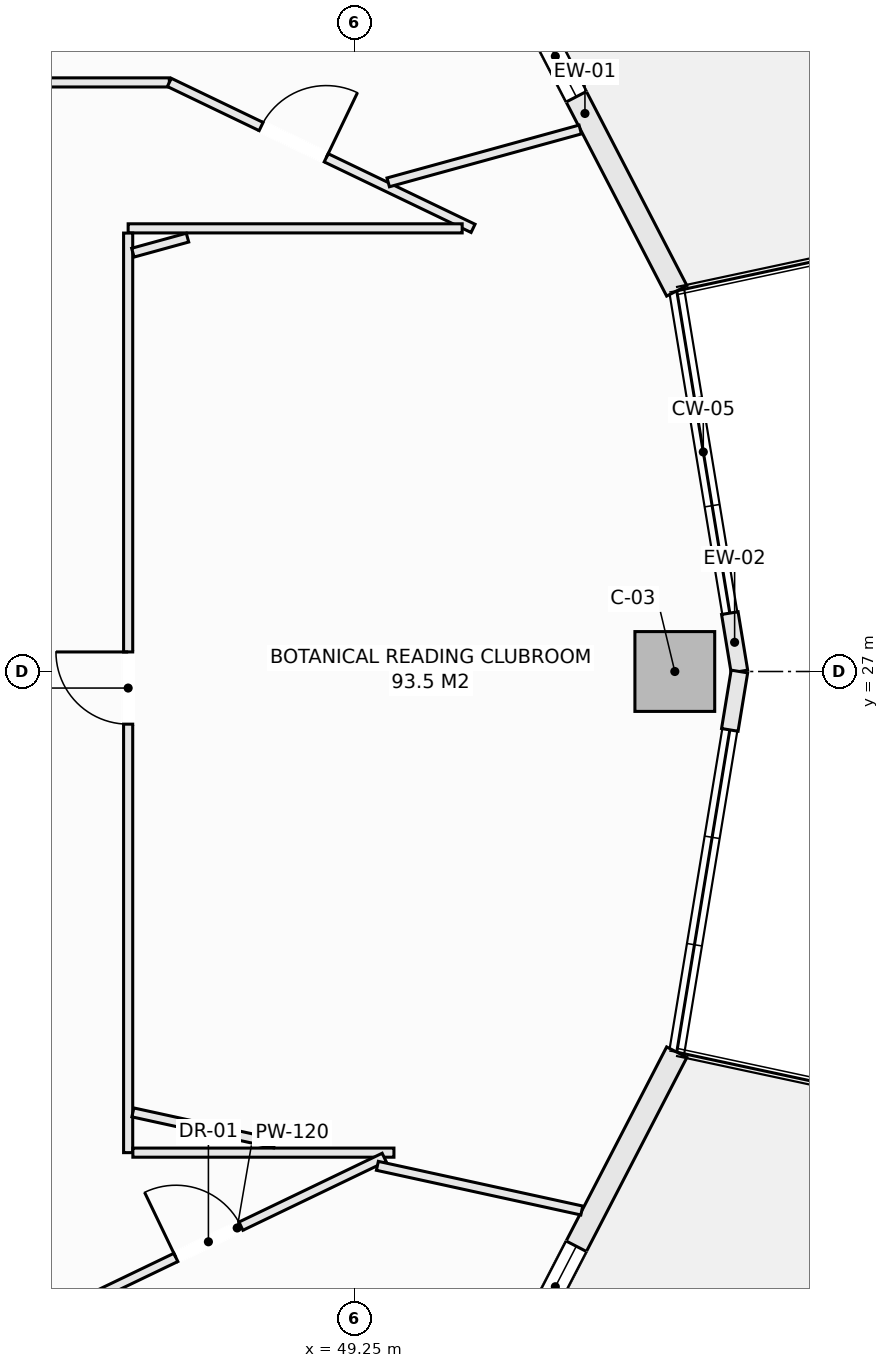
"""IFC4 building model, lengths in metres.
Left out: names, types, materials, properties, quantities, classifications, styles, units other than length and angle.
Written with IfcOpenShell. Run it as: python <this file> out.ifc"""

import sys

from ifc_helpers import new_model, si_unit, direction, frame, frame_2d, origin, origin_2d, place, context, subcontext, project, spatial, rectangle, extrude, element, fill, save


model = new_model("IFC4")
c1 = context("Model", 3, precision=1e-05, world=origin(), true_north=direction((0.0, 1.0)))
c2 = subcontext(c1, "Body", "Model", "MODEL_VIEW")
j1 = project(units=[si_unit("LENGTHUNIT", "METRE"), si_unit("PLANEANGLEUNIT", "RADIAN")], contexts=[c1])
p1 = place(None, origin())
s1 = spatial("IfcSite", under=j1, at=p1, CompositionType="ELEMENT")
p2 = place(p1, origin())
s2 = spatial("IfcBuilding", under=s1, at=p2, CompositionType="ELEMENT")
p3 = place(p2, frame((0.0, 0.0, 100.8)))
s3 = spatial("IfcBuildingStorey", under=s2, at=p3, CompositionType="ELEMENT", Elevation=100.8)
p4 = place(p3, frame((53.462, 27.0, -0.28), z_axis=(0.0, 0.0, 1.0), x_axis=(1.0, 0.0, 0.0)))
e1 = element("IfcColumn", 1, at=p4, inside=s3, PredefinedType="COLUMN", context=c2, shape_type="SweptSolid", body=[
    extrude(rectangle(XDim=1.05, YDim=1.05, at=origin_2d()), origin(), (0.0, 0.0, 1.0), 4.51),
])
p5 = place(p3, frame((54.186, 27.768, 0.0), z_axis=(0.0, 0.0, 1.0), x_axis=(0.162465965887, -0.986714148033, 0.0)))
e2 = element("IfcWall", 2, at=p5, inside=s3, PredefinedType="SOLIDWALL", context=c2, shape_type="SweptSolid", body=[
    extrude(rectangle(XDim=0.778, YDim=0.22, at=frame_2d((0.389, 0.0))), origin(), (0.0, 0.0, 1.0), 3.753),
])
p6 = place(p3, frame((51.072, 36.675, 0.0), z_axis=(0.0, 0.0, 1.0), x_axis=(0.459767899643, -0.888039119892, 0.0)))
e3 = element("IfcWall", 3, at=p6, inside=s3, PredefinedType="SOLIDWALL", context=c2, shape_type="SweptSolid", body=[
    extrude(rectangle(XDim=5.255, YDim=0.3, at=frame_2d((2.628, 0.0))), origin(), (0.0, 0.0, 1.0), 3.753),
])
p7 = place(p6, frame((1.18, 0.0, 0.72)))
e4 = element("IfcOpeningElement", 4, at=p7, cuts=e3, PredefinedType="OPENING", context=c2, shape_type="SweptSolid", body=[
    extrude(rectangle(XDim=1.2, YDim=1.65, at=frame_2d((0.6, 0.825))), frame((0.0, 0.16, 0.0), z_axis=(0.0, -1.0, 0.0), x_axis=(1.0, 0.0, 0.0)), (0.0, 0.0, 1.0), 0.32),
])
p8 = place(p3, frame((51.072, 17.325, 0.0), z_axis=(0.0, 0.0, 1.0), x_axis=(0.459767899643, 0.888039119892, 0.0)))
e5 = element("IfcWall", 5, at=p8, inside=s3, PredefinedType="SOLIDWALL", context=c2, shape_type="SweptSolid", body=[
    extrude(rectangle(XDim=5.255, YDim=0.3, at=frame_2d((2.628, 0.0))), origin(), (0.0, 0.0, 1.0), 3.753),
])
p9 = place(p8, frame((1.18, 0.0, 0.72)))
e6 = element("IfcOpeningElement", 6, at=p9, cuts=e5, PredefinedType="OPENING", context=c2, shape_type="SweptSolid", body=[
    extrude(rectangle(XDim=1.2, YDim=1.65, at=frame_2d((0.6, 0.825))), frame((0.0, 0.16, 0.0), z_axis=(0.0, -1.0, 0.0), x_axis=(1.0, 0.0, 0.0)), (0.0, 0.0, 1.0), 0.32),
])
p10 = place(p3, frame((54.186, 26.232, 0.0), z_axis=(0.0, 0.0, 1.0), x_axis=(0.162465965887, 0.986714148033, 0.0)))
e7 = element("IfcWall", 7, at=p10, inside=s3, PredefinedType="SOLIDWALL", context=c2, shape_type="SweptSolid", body=[
    extrude(rectangle(XDim=0.778, YDim=0.22, at=frame_2d((0.389, 0.0))), origin(), (0.0, 0.0, 1.0), 3.753),
])
for number, where, z_axis, x_axis in (
    (8, (54.129, 38.122, 0.0), (0.0, 0.0, 1.0), (0.441, -0.897, 0.0)),
    (9, (54.129, 15.878, 0.0), (0.0, 0.0, 1.0), (0.441, 0.897, 0.0)),
):
    element("IfcWall", number, at=place(p3, frame(where, z_axis=z_axis, x_axis=x_axis)), inside=s3, PredefinedType="PARAPET", context=c2, shape_type="SweptSolid", body=[
        extrude(rectangle(XDim=6.056, YDim=0.22, at=frame_2d((3.028, 0.0))), origin(), (0.0, 0.0, 1.0), 0.52),
    ])
p11 = place(p3, frame((44.412, 34.75, 0.0), z_axis=(0.0, 0.0, 1.0), x_axis=(1.0, 0.0, 0.0)))
e10 = element("IfcWall", 10, at=p11, inside=s3, PredefinedType="PARTITIONING", context=c2, shape_type="SweptSolid", body=[
    extrude(rectangle(XDim=2.4, YDim=0.12, at=frame_2d((1.2, 0.0))), origin(), (0.0, 0.0, 1.0), 3.912),
])
p12 = place(p3, frame((46.812, 34.75, 0.0), z_axis=(0.0, 0.0, 1.0), x_axis=(0.901364880585, -0.433060448492, 0.0)))
e11 = element("IfcWall", 11, at=p12, inside=s3, PredefinedType="PARTITIONING", context=c2, shape_type="SweptSolid", body=[
    extrude(rectangle(XDim=4.433, YDim=0.12, at=frame_2d((2.217, 0.0))), origin(), (0.0, 0.0, 1.0), 4.23),
])
p13 = place(p12, frame((1.34, 0.0, 0.0)))
e12 = element("IfcOpeningElement", 12, at=p13, cuts=e11, PredefinedType="OPENING", context=c2, shape_type="SweptSolid", body=[
    extrude(rectangle(XDim=0.95, YDim=2.1, at=frame_2d((0.475, 1.05))), frame((0.0, 0.07, 0.0), z_axis=(0.0, -1.0, 0.0), x_axis=(1.0, 0.0, 0.0)), (0.0, 0.0, 1.0), 0.14),
])
p14 = place(p3, frame((46.27, 32.83, 0.0), z_axis=(0.0, 0.0, 1.0), x_axis=(1.0, 0.0, 0.0)))
e13 = element("IfcWall", 13, at=p14, inside=s3, PredefinedType="PARTITIONING", context=c2, shape_type="SweptSolid", body=[
    extrude(rectangle(XDim=4.395, YDim=0.12, at=frame_2d((2.197, 0.0))), origin(), (0.0, 0.0, 1.0), 4.23),
])
p15 = place(p3, frame((46.27, 20.67, 0.0), z_axis=(0.0, 0.0, 1.0), x_axis=(0.0, 1.0, 0.0)))
e14 = element("IfcWall", 14, at=p15, inside=s3, PredefinedType="PARTITIONING", context=c2, shape_type="SweptSolid", body=[
    extrude(rectangle(XDim=12.098, YDim=0.12, at=frame_2d((6.049, 0.0))), origin(), (0.0, 0.0, 1.0), 4.23),
])
p16 = place(p15, frame((5.637, 0.0, 0.0)))
e15 = element("IfcOpeningElement", 15, at=p16, cuts=e14, PredefinedType="OPENING", context=c2, shape_type="SweptSolid", body=[
    extrude(rectangle(XDim=0.95, YDim=2.1, at=frame_2d((0.475, 1.05))), frame((0.0, 0.07, 0.0), z_axis=(0.0, -1.0, 0.0), x_axis=(1.0, 0.0, 0.0)), (0.0, 0.0, 1.0), 0.14),
])
p17 = place(p3, frame((46.332, 20.67, 0.0), z_axis=(0.0, 0.0, 1.0), x_axis=(1.0, 0.0, 0.0)))
e16 = element("IfcWall", 16, at=p17, inside=s3, PredefinedType="PARTITIONING", context=c2, shape_type="SweptSolid", body=[
    extrude(rectangle(XDim=3.435, YDim=0.12, at=frame_2d((1.718, 0.0))), origin(), (0.0, 0.0, 1.0), 4.23),
])
p18 = place(p3, frame((45.771, 18.75, 0.0), z_axis=(0.0, 0.0, 1.0), x_axis=(0.901361373705, 0.433067747578, 0.0)))
e17 = element("IfcWall", 17, at=p18, inside=s3, PredefinedType="PARTITIONING", context=c2, shape_type="SweptSolid", body=[
    extrude(rectangle(XDim=4.29, YDim=0.12, at=frame_2d((2.145, 0.0))), origin(), (0.0, 0.0, 1.0), 4.23),
])
p19 = place(p18, frame((1.25, 0.0, 0.0)))
e18 = element("IfcOpeningElement", 18, at=p19, cuts=e17, PredefinedType="OPENING", context=c2, shape_type="SweptSolid", body=[
    extrude(rectangle(XDim=0.95, YDim=2.1, at=frame_2d((0.475, 1.05))), frame((0.0, 0.07, 0.0), z_axis=(0.0, -1.0, 0.0), x_axis=(1.0, 0.0, 0.0)), (0.0, 0.0, 1.0), 0.14),
])
p20 = place(p3, frame((46.332, 21.199, 0.0), z_axis=(0.0, 0.0, 1.0), x_axis=(0.976969234372, -0.213380212509, 0.0)))
e19 = element("IfcWall", 19, at=p20, inside=s3, PredefinedType="PARTITIONING", context=c2, shape_type="SweptSolid", body=[
    extrude(rectangle(XDim=1.908, YDim=0.12, at=frame_2d((0.954, 0.0))), origin(), (0.0, 0.0, 1.0), 4.23),
])
p21 = place(p3, frame((49.549, 20.497, 0.0), z_axis=(0.0, 0.0, 1.0), x_axis=(0.97693240482, -0.213548768229, 0.0)))
e20 = element("IfcWall", 20, at=p21, inside=s3, PredefinedType="PARTITIONING", context=c2, shape_type="SweptSolid", body=[
    extrude(rectangle(XDim=2.753, YDim=0.12, at=frame_2d((1.376, 0.0))), origin(), (0.0, 0.0, 1.0), 4.23),
])
p22 = place(p3, frame((46.332, 32.51, 0.0), z_axis=(0.0, 0.0, 1.0), x_axis=(0.964088084793, 0.265582689119, 0.0)))
e21 = element("IfcWall", 21, at=p22, inside=s3, PredefinedType="PARTITIONING", context=c2, shape_type="SweptSolid", body=[
    extrude(rectangle(XDim=0.746, YDim=0.12, at=frame_2d((0.373, 0.0))), origin(), (0.0, 0.0, 1.0), 4.23),
])
p23 = place(p3, frame((49.692, 33.435, 0.0), z_axis=(0.0, 0.0, 1.0), x_axis=(0.964126743029, 0.265442316476, 0.0)))
e22 = element("IfcWall", 22, at=p23, inside=s3, PredefinedType="PARTITIONING", context=c2, shape_type="SweptSolid", body=[
    extrude(rectangle(XDim=2.62, YDim=0.12, at=frame_2d((1.31, 0.0))), origin(), (0.0, 0.0, 1.0), 4.23),
])
p24 = place(p7, origin())
e23 = element("IfcWindow", 23, at=p24, inside=s3, PartitioningType="SINGLE_PANEL", PredefinedType="WINDOW", context=c2, shape_type="SweptSolid", body=[
    extrude(rectangle(XDim=1.2, YDim=1.65, at=frame_2d((0.6, 0.825))), frame((0.0, 0.03, 0.0), z_axis=(0.0, -1.0, 0.0), x_axis=(1.0, 0.0, 0.0)), (0.0, 0.0, 1.0), 0.06),
])
fill(e4, e23)
p25 = place(p9, origin())
e24 = element("IfcWindow", 24, at=p25, inside=s3, PartitioningType="SINGLE_PANEL", PredefinedType="WINDOW", context=c2, shape_type="SweptSolid", body=[
    extrude(rectangle(XDim=1.2, YDim=1.65, at=frame_2d((0.6, 0.825))), frame((0.0, 0.03, 0.0), z_axis=(0.0, -1.0, 0.0), x_axis=(1.0, 0.0, 0.0)), (0.0, 0.0, 1.0), 0.06),
])
fill(e6, e24)
p26 = place(p19, origin())
e25 = element("IfcDoor", 25, at=p26, inside=s3, OperationType="SINGLE_SWING_LEFT", PredefinedType="DOOR", context=c2, shape_type="SweptSolid", body=[
    extrude(rectangle(XDim=0.95, YDim=2.1, at=frame_2d((0.475, 1.05))), frame((0.0, 0.025, 0.0), z_axis=(0.0, -1.0, 0.0), x_axis=(1.0, 0.0, 0.0)), (0.0, 0.0, 1.0), 0.05),
])
fill(e18, e25)
p27 = place(p16, origin())
e26 = element("IfcDoor", 26, at=p27, inside=s3, OperationType="SINGLE_SWING_RIGHT", PredefinedType="DOOR", context=c2, shape_type="SweptSolid", body=[
    extrude(rectangle(XDim=0.95, YDim=2.1, at=frame_2d((0.475, 1.05))), frame((0.0, 0.025, 0.0), z_axis=(0.0, -1.0, 0.0), x_axis=(1.0, 0.0, 0.0)), (0.0, 0.0, 1.0), 0.05),
])
fill(e15, e26)
p28 = place(p13, origin())
e27 = element("IfcDoor", 27, at=p28, inside=s3, OperationType="SINGLE_SWING_RIGHT", PredefinedType="DOOR", context=c2, shape_type="SweptSolid", body=[
    extrude(rectangle(XDim=0.95, YDim=2.1, at=frame_2d((0.475, 1.05))), frame((0.0, 0.025, 0.0), z_axis=(0.0, -1.0, 0.0), x_axis=(1.0, 0.0, 0.0)), (0.0, 0.0, 1.0), 0.05),
])
fill(e12, e27)
save(model, sys.argv[1])
